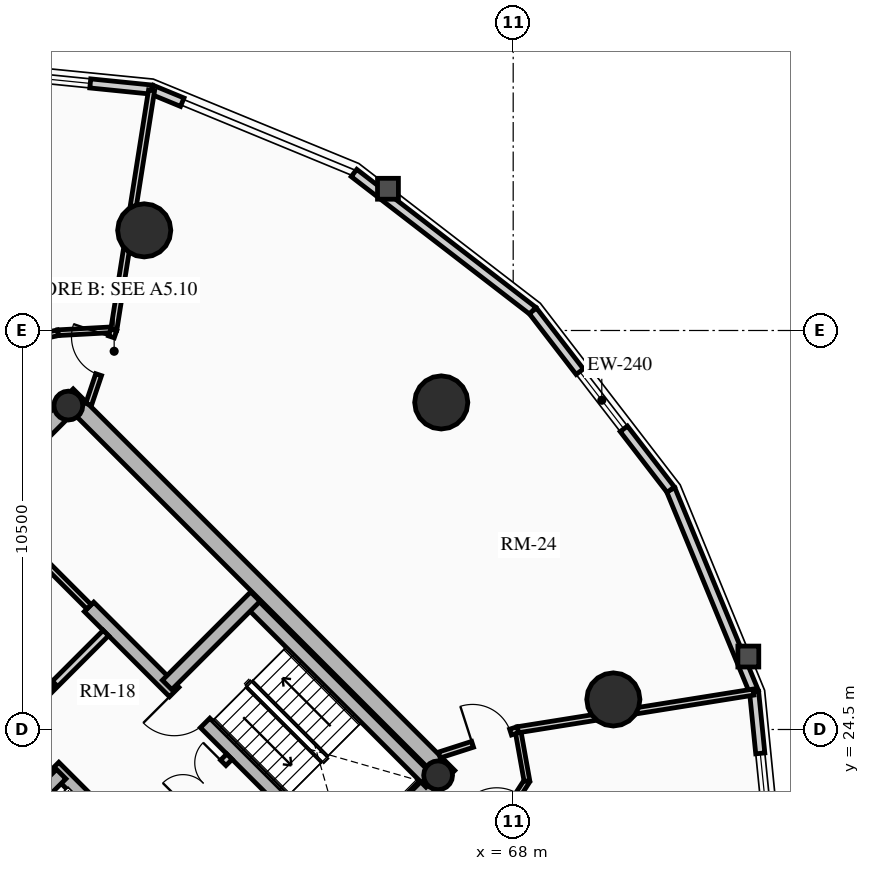
"""IFC4 building model, lengths in metres.
Left out: names, types, materials, properties, quantities, classifications, styles, units other than length and angle.
Written with IfcOpenShell. Run it as: python <this file> out.ifc"""

import sys

from ifc_helpers import new_model, si_unit, direction, frame, frame_2d, origin, origin_2d, place, context, subcontext, project, spatial, rectangle, circle, hollow_circle, extrude, source, transform, mapped, element, fill, save


model = new_model("IFC4")
c1 = context("Model", 3, precision=1e-05, world=origin(), true_north=direction((0.0, 1.0)))
c2 = subcontext(c1, "Body", "Model", "MODEL_VIEW")
j1 = project(units=[si_unit("LENGTHUNIT", "METRE"), si_unit("PLANEANGLEUNIT", "RADIAN")], contexts=[c1])
p1 = place(None, origin())
s1 = spatial("IfcSite", under=j1, at=p1, CompositionType="ELEMENT")
p2 = place(p1, origin())
s2 = spatial("IfcBuilding", under=s1, at=p2, CompositionType="ELEMENT")
p3 = place(p2, frame((0.0, 0.0, 136.6)))
s3 = spatial("IfcBuildingStorey", under=s2, at=p3, CompositionType="ELEMENT", Elevation=136.6)
for number, where, z_axis, x_axis in (
    (1, (58.737, 15.697, 0.0), (0.0, 0.0, 1.0), (-0.707, 0.707, 0.0)),
    (2, (66.303, 23.263, 0.0), (0.0, 0.0, 1.0), (-0.707, 0.707, 0.0)),
):
    element("IfcWall", number, at=place(p3, frame(where, z_axis=z_axis, x_axis=x_axis)), inside=s3, PredefinedType="SHEAR", context=c2, shape_type="SweptSolid", body=[
        extrude(rectangle(XDim=14.2, YDim=0.45, at=frame_2d((7.1, 0.0))), origin(), (0.0, 0.0, 1.0), 3.72),
    ])
p4 = place(p3, frame((58.578, 15.856, 0.0), z_axis=(0.0, 0.0, 1.0), x_axis=(0.707106781187, 0.707106781187, 0.0)))
e3 = element("IfcWall", 3, at=p4, inside=s3, PredefinedType="SHEAR", context=c2, shape_type="SweptSolid", body=[
    extrude(rectangle(XDim=10.7, YDim=0.45, at=frame_2d((5.35, 0.0))), origin(), (0.0, 0.0, 1.0), 3.72),
])
m1 = source(origin(), c2, "Body", "SweptSolid", [
    extrude(rectangle(XDim=1.5, YDim=2.02, at=frame_2d((0.75, 1.01))), frame((0.0, 0.235, 0.0), z_axis=(0.0, -1.0, 0.0), x_axis=(1.0, 0.0, 0.0)), (0.0, 0.0, 1.0), 0.47),
])
p5 = place(p4, frame((5.45, 0.0, 0.0)))
e4 = element("IfcOpeningElement", 4, at=p5, cuts=e3, PredefinedType="OPENING", context=c2, shape_type="MappedRepresentation", body=[
    mapped(m1, transform((0.0, 0.0, 0.0), x_axis=(1.0, 0.0, 0.0), y_axis=(0.0, 1.0, 0.0), z_axis=(0.0, 0.0, 1.0), scale=1.0)),
])
p6 = place(p3, frame((48.856, 25.578, 0.0), z_axis=(0.0, 0.0, 1.0), x_axis=(0.707106781187, 0.707106781187, 0.0)))
e5 = element("IfcWall", 5, at=p6, inside=s3, PredefinedType="SHEAR", context=c2, shape_type="SweptSolid", body=[
    extrude(rectangle(XDim=10.7, YDim=0.45, at=frame_2d((5.35, 0.0))), origin(), (0.0, 0.0, 1.0), 3.72),
])
p7 = place(p6, frame((4.6, 0.0, 0.0)))
e6 = element("IfcOpeningElement", 6, at=p7, cuts=e5, PredefinedType="OPENING", context=c2, shape_type="MappedRepresentation", body=[
    mapped(m1, transform((0.0, 0.0, 0.0), x_axis=(1.0, 0.0, 0.0), y_axis=(0.0, 1.0, 0.0), z_axis=(0.0, 0.0, 1.0), scale=1.0)),
])
p8 = place(p3, frame((61.078, 18.355, 0.0), z_axis=(0.0, 0.0, 1.0), x_axis=(-0.707106781187, 0.707106781187, 0.0)))
e7 = element("IfcWall", 7, at=p8, inside=s3, PredefinedType="SHEAR", context=c2, shape_type="SweptSolid", body=[
    extrude(rectangle(XDim=13.75, YDim=0.35, at=frame_2d((6.875, 0.0))), origin(), (0.0, 0.0, 1.0), 3.72),
])
m2 = source(origin(), c2, "Body", "SweptSolid", [
    extrude(rectangle(XDim=1.1, YDim=2.015, at=frame_2d((0.55, 1.007))), frame((0.0, 0.185, 0.0), z_axis=(0.0, -1.0, 0.0), x_axis=(1.0, 0.0, 0.0)), (0.0, 0.0, 1.0), 0.37),
])
p9 = place(p8, frame((4.875, 0.0, 0.0)))
e8 = element("IfcOpeningElement", 8, at=p9, cuts=e7, PredefinedType="OPENING", context=c2, shape_type="MappedRepresentation", body=[
    mapped(m2, transform((0.0, 0.0, 0.0), x_axis=(1.0, 0.0, 0.0), y_axis=(0.0, 1.0, 0.0), z_axis=(0.0, 0.0, 1.0), scale=1.0)),
])
p10 = place(p8, frame((0.65, 0.0, 0.0)))
e9 = element("IfcOpeningElement", 9, at=p10, cuts=e7, PredefinedType="OPENING", context=c2, shape_type="MappedRepresentation", body=[
    mapped(m2, transform((0.0, 0.0, 0.0), x_axis=(1.0, 0.0, 0.0), y_axis=(0.0, 1.0, 0.0), z_axis=(0.0, 0.0, 1.0), scale=1.0)),
])
p11 = place(p8, frame((2.65, 0.0, 0.0)))
e10 = element("IfcOpeningElement", 10, at=p11, cuts=e7, PredefinedType="OPENING", context=c2, shape_type="MappedRepresentation", body=[
    mapped(m2, transform((0.0, 0.0, 0.0), x_axis=(1.0, 0.0, 0.0), y_axis=(0.0, 1.0, 0.0), z_axis=(0.0, 0.0, 1.0), scale=1.0)),
])
m3 = source(origin(), c2, "Body", "SweptSolid", [
    extrude(rectangle(XDim=1.15, YDim=2.02, at=frame_2d((0.575, 1.01))), frame((0.0, 0.185, 0.0), z_axis=(0.0, -1.0, 0.0), x_axis=(1.0, 0.0, 0.0)), (0.0, 0.0, 1.0), 0.37),
])
p12 = place(p8, frame((7.295, 0.0, 0.0)))
e11 = element("IfcOpeningElement", 11, at=p12, cuts=e7, PredefinedType="OPENING", context=c2, shape_type="MappedRepresentation", body=[
    mapped(m3, transform((0.0, 0.0, 0.0), x_axis=(1.0, 0.0, 0.0), y_axis=(0.0, 1.0, 0.0), z_axis=(0.0, 0.0, 1.0), scale=1.0)),
])
p13 = place(p3, frame((63.645, 20.922, 0.0), z_axis=(0.0, 0.0, 1.0), x_axis=(-0.70711946392, 0.707094098226, 0.0)))
e12 = element("IfcWall", 12, at=p13, inside=s3, PredefinedType="SHEAR", context=c2, shape_type="SweptSolid", body=[
    extrude(rectangle(XDim=9.625, YDim=0.35, at=frame_2d((4.812, 0.0))), origin(), (0.0, 0.0, 1.0), 3.72),
])
p14 = place(p13, frame((5.305, 0.0, 0.0)))
e13 = element("IfcOpeningElement", 13, at=p14, cuts=e12, PredefinedType="OPENING", context=c2, shape_type="MappedRepresentation", body=[
    mapped(m3, transform((0.0, 0.0, 0.0), x_axis=(1.0, 0.0, 0.0), y_axis=(0.0, 1.0, 0.0), z_axis=(0.0, 0.0, 1.0), scale=1.0)),
])
p15 = place(p3, frame((53.784, 21.003, 0.0), z_axis=(0.0, 0.0, 1.0), x_axis=(0.707106781187, 0.707106781187, 0.0)))
e14 = element("IfcWall", 14, at=p15, inside=s3, PredefinedType="SHEAR", context=c2, shape_type="SweptSolid", body=[
    extrude(rectangle(XDim=3.285, YDim=0.35, at=frame_2d((1.643, 0.0))), origin(), (0.0, 0.0, 1.0), 3.72),
])
p16 = place(p3, frame((65.83, 23.107, 0.0), z_axis=(0.0, 0.0, 1.0), x_axis=(-0.707088616009, 0.707124945897, 0.0)))
e15 = element("IfcWall", 15, at=p16, inside=s3, PredefinedType="SHEAR", context=c2, shape_type="SweptSolid", body=[
    extrude(rectangle(XDim=6.72, YDim=0.35, at=frame_2d((3.36, 0.0))), origin(), (0.0, 0.0, 1.0), 3.72),
])
p17 = place(p3, frame((58.893, 25.674, 0.0), z_axis=(0.0, 0.0, 1.0), x_axis=(0.707106781187, 0.707106781187, 0.0)))
e16 = element("IfcWall", 16, at=p17, inside=s3, PredefinedType="SHEAR", context=c2, shape_type="SweptSolid", body=[
    extrude(rectangle(XDim=3.285, YDim=0.35, at=frame_2d((1.643, 0.0))), origin(), (0.0, 0.0, 1.0), 3.72),
])
for number, where, z_axis, x_axis in (
    (17, (66.024, 23.294, 0.0), (0.0, 0.0, 1.0), (0.707, 0.707, 0.0)),
    (18, (56.294, 33.024, 0.0), (0.0, 0.0, 1.0), (0.707, 0.707, 0.0)),
):
    element("IfcColumn", number, at=place(p3, frame(where, z_axis=z_axis, x_axis=x_axis)), inside=s3, PredefinedType="COLUMN", context=c2, shape_type="SweptSolid", body=[
        extrude(hollow_circle(Radius=0.38, WallThickness=0.032, at=origin_2d()), origin(), (0.0, 0.0, 1.0), 3.72),
    ])
for number, where, z_axis, x_axis in (
    (19, (66.107, 33.107, 0.0), (0.0, 0.0, 1.0), (1.0, 0.0, 0.0)),
    (20, (58.291, 37.635, 0.0), (0.0, 0.0, 1.0), (1.0, 0.0, 0.0)),
    (21, (70.635, 25.291, 0.0), (0.0, 0.0, 1.0), (1.0, 0.0, 0.0)),
):
    element("IfcColumn", number, at=place(p3, frame(where, z_axis=z_axis, x_axis=x_axis)), inside=s3, PredefinedType="USERDEFINED", context=c2, shape_type="SweptSolid", body=[
        extrude(circle(Radius=0.7, at=origin_2d()), origin(), (0.0, 0.0, 1.0), 3.72),
    ])
p18 = place(p3, frame((63.811, 39.145, 0.0), z_axis=(0.0, 0.0, 1.0), x_axis=(0.791982052206, -0.61054437102, 0.0)))
e22 = element("IfcWall", 22, at=p18, inside=s3, PredefinedType="SOLIDWALL", context=c2, shape_type="SweptSolid", body=[
    extrude(rectangle(XDim=5.942, YDim=0.24, at=frame_2d((2.971, 0.0))), origin(), (0.0, 0.0, 1.0), 2.949),
])
p19 = place(p3, frame((58.487, 41.339, 0.0), z_axis=(0.0, 0.0, 1.0), x_axis=(0.924556017656, -0.381046152345, 0.0)))
e23 = element("IfcWall", 23, at=p19, inside=s3, PredefinedType="SOLIDWALL", context=c2, shape_type="SweptSolid", body=[
    extrude(rectangle(XDim=0.87, YDim=0.24, at=frame_2d((0.435, 0.0))), origin(), (0.0, 0.0, 1.0), 2.949),
])
p20 = place(p3, frame((53.067, 41.885, 0.0), z_axis=(0.0, 0.0, 1.0), x_axis=(0.994971754311, -0.10015591906, 0.0)))
e24 = element("IfcWall", 24, at=p20, inside=s3, PredefinedType="SOLIDWALL", context=c2, shape_type="SweptSolid", body=[
    extrude(rectangle(XDim=5.448, YDim=0.24, at=frame_2d((2.724, 0.0))), origin(), (0.0, 0.0, 1.0), 2.949),
])
m4 = source(origin(), c2, "Body", "SweptSolid", [
    extrude(rectangle(XDim=2.2, YDim=1.35, at=frame_2d((1.1, 0.675))), frame((0.0, 0.13, 0.0), z_axis=(0.0, -1.0, 0.0), x_axis=(1.0, 0.0, 0.0)), (0.0, 0.0, 1.0), 0.26),
])
p21 = place(p20, frame((1.624, 0.0, 0.65)))
e25 = element("IfcOpeningElement", 25, at=p21, cuts=e24, PredefinedType="OPENING", context=c2, shape_type="MappedRepresentation", body=[
    mapped(m4, transform((0.0, 0.0, 0.0), x_axis=(1.0, 0.0, 0.0), y_axis=(0.0, 1.0, 0.0), z_axis=(0.0, 0.0, 1.0), scale=1.0)),
])
p22 = place(p3, frame((74.339, 25.487, 0.0), z_axis=(0.0, 0.0, 1.0), x_axis=(0.10015591906, -0.994971754311, 0.0)))
e26 = element("IfcWall", 26, at=p22, inside=s3, PredefinedType="SOLIDWALL", context=c2, shape_type="SweptSolid", body=[
    extrude(rectangle(XDim=5.448, YDim=0.24, at=frame_2d((2.724, 0.0))), origin(), (0.0, 0.0, 1.0), 2.949),
])
p23 = place(p22, frame((1.624, 0.0, 0.65)))
e27 = element("IfcOpeningElement", 27, at=p23, cuts=e26, PredefinedType="OPENING", context=c2, shape_type="MappedRepresentation", body=[
    mapped(m4, transform((0.0, 0.0, 0.0), x_axis=(1.0, 0.0, 0.0), y_axis=(0.0, 1.0, 0.0), z_axis=(0.0, 0.0, 1.0), scale=1.0)),
])
p24 = place(p3, frame((72.145, 30.811, 0.0), z_axis=(0.0, 0.0, 1.0), x_axis=(0.381027003055, -0.924563909604, 0.0)))
e28 = element("IfcWall", 28, at=p24, inside=s3, PredefinedType="SOLIDWALL", context=c2, shape_type="SweptSolid", body=[
    extrude(rectangle(XDim=5.758, YDim=0.24, at=frame_2d((2.879, 0.0))), origin(), (0.0, 0.0, 1.0), 2.949),
])
p25 = place(p3, frame((68.517, 35.517, 0.0), z_axis=(0.0, 0.0, 1.0), x_axis=(0.61054437102, -0.791982052206, 0.0)))
e29 = element("IfcWall", 29, at=p25, inside=s3, PredefinedType="SOLIDWALL", context=c2, shape_type="SweptSolid", body=[
    extrude(rectangle(XDim=5.942, YDim=0.24, at=frame_2d((2.971, 0.0))), origin(), (0.0, 0.0, 1.0), 2.949),
])
m5 = source(origin(), c2, "Body", "SweptSolid", [
    extrude(rectangle(XDim=1.9, YDim=1.35, at=frame_2d((0.95, 0.675))), frame((0.0, 0.13, 0.0), z_axis=(0.0, -1.0, 0.0), x_axis=(1.0, 0.0, 0.0)), (0.0, 0.0, 1.0), 0.26),
])
p26 = place(p25, frame((2.021, 0.0, 0.65)))
e30 = element("IfcOpeningElement", 30, at=p26, cuts=e29, PredefinedType="OPENING", context=c2, shape_type="MappedRepresentation", body=[
    mapped(m5, transform((0.0, 0.0, 0.0), x_axis=(1.0, 0.0, 0.0), y_axis=(0.0, 1.0, 0.0), z_axis=(0.0, 0.0, 1.0), scale=1.0)),
])
p27 = place(p3, frame((58.214, 21.467, 0.0), z_axis=(0.0, 0.0, 1.0), x_axis=(0.707106781187, 0.707106781187, 0.0)))
e31 = element("IfcWall", 31, at=p27, inside=s3, PredefinedType="PARTITIONING", context=c2, shape_type="SweptSolid", body=[
    extrude(rectangle(XDim=3.28, YDim=0.2, at=frame_2d((1.64, 0.0))), origin(), (0.0, 0.0, 1.0), 3.425),
])
m6 = source(origin(), c2, "Body", "SweptSolid", [
    extrude(rectangle(XDim=1.5, YDim=2.02, at=frame_2d((0.75, 1.01))), frame((0.0, 0.11, 0.0), z_axis=(0.0, -1.0, 0.0), x_axis=(1.0, 0.0, 0.0)), (0.0, 0.0, 1.0), 0.22),
])
p28 = place(p27, frame((1.55, 0.0, 0.0)))
e32 = element("IfcOpeningElement", 32, at=p28, cuts=e31, PredefinedType="OPENING", context=c2, shape_type="MappedRepresentation", body=[
    mapped(m6, transform((0.0, 0.0, 0.0), x_axis=(1.0, 0.0, 0.0), y_axis=(0.0, 1.0, 0.0), z_axis=(0.0, 0.0, 1.0), scale=1.0)),
])
p29 = place(p3, frame((54.961, 24.719, 0.0), z_axis=(0.0, 0.0, 1.0), x_axis=(0.707106781187, 0.707106781187, 0.0)))
e33 = element("IfcWall", 33, at=p29, inside=s3, PredefinedType="PARTITIONING", context=c2, shape_type="SweptSolid", body=[
    extrude(rectangle(XDim=3.28, YDim=0.2, at=frame_2d((1.64, 0.0))), origin(), (0.0, 0.0, 1.0), 3.425),
])
m7 = source(origin(), c2, "Body", "SweptSolid", [
    extrude(rectangle(XDim=0.9, YDim=2.005, at=frame_2d((0.45, 1.002))), frame((0.0, 0.11, 0.0), z_axis=(0.0, -1.0, 0.0), x_axis=(1.0, 0.0, 0.0)), (0.0, 0.0, 1.0), 0.22),
])
p30 = place(p29, frame((0.16, 0.0, 0.0)))
e34 = element("IfcOpeningElement", 34, at=p30, cuts=e33, PredefinedType="OPENING", context=c2, shape_type="MappedRepresentation", body=[
    mapped(m7, transform((0.0, 0.0, 0.0), x_axis=(1.0, 0.0, 0.0), y_axis=(0.0, 1.0, 0.0), z_axis=(0.0, 0.0, 1.0), scale=1.0)),
])
p31 = place(p3, frame((55.874, 25.631, 0.0), z_axis=(0.0, 0.0, 1.0), x_axis=(-0.707157639372, 0.707055919343, 0.0)))
e35 = element("IfcWall", 35, at=p31, inside=s3, PredefinedType="PARTITIONING", context=c2, shape_type="SweptSolid", body=[
    extrude(rectangle(XDim=2.4, YDim=0.2, at=frame_2d((1.2, 0.0))), origin(), (0.0, 0.0, 1.0), 3.425),
])
p32 = place(p3, frame((56.839, 27.728, 0.0), z_axis=(0.0, 0.0, 1.0), x_axis=(-0.707106781187, 0.707106781187, 0.0)))
e36 = element("IfcWall", 36, at=p32, inside=s3, PredefinedType="PARTITIONING", context=c2, shape_type="SweptSolid", body=[
    extrude(rectangle(XDim=3.9, YDim=0.16, at=frame_2d((1.95, 0.0))), origin(), (0.0, 0.0, 1.0), 3.425),
])
m8 = source(origin(), c2, "Body", "SweptSolid", [
    extrude(rectangle(XDim=0.9, YDim=2.005, at=frame_2d((0.45, 1.002))), frame((0.0, 0.09, 0.0), z_axis=(0.0, -1.0, 0.0), x_axis=(1.0, 0.0, 0.0)), (0.0, 0.0, 1.0), 0.18),
])
p33 = place(p32, frame((2.2, 0.0, 0.0)))
e37 = element("IfcOpeningElement", 37, at=p33, cuts=e36, PredefinedType="OPENING", context=c2, shape_type="MappedRepresentation", body=[
    mapped(m8, transform((0.0, 0.0, 0.0), x_axis=(1.0, 0.0, 0.0), y_axis=(0.0, 1.0, 0.0), z_axis=(0.0, 0.0, 1.0), scale=1.0)),
])
p34 = place(p3, frame((57.491, 35.021, 0.0), z_axis=(0.0, 0.0, 1.0), x_axis=(-0.9985194771, -0.054395347698, 0.0)))
e38 = element("IfcWall", 38, at=p34, inside=s3, PredefinedType="PARTITIONING", context=c2, shape_type="SweptSolid", body=[
    extrude(rectangle(XDim=1.472, YDim=0.15, at=frame_2d((0.736, 0.0))), origin(), (0.0, 0.0, 1.0), 2.995),
])
p35 = place(p3, frame((56.021, 34.941, 0.0), z_axis=(0.0, 0.0, 1.0), x_axis=(-0.975309543901, -0.220842236847, 0.0)))
e39 = element("IfcWall", 39, at=p35, inside=s3, PredefinedType="PARTITIONING", context=c2, shape_type="SweptSolid", body=[
    extrude(rectangle(XDim=1.585, YDim=0.15, at=frame_2d((0.792, 0.0))), origin(), (0.0, 0.0, 1.0), 2.995),
])
p36 = place(p3, frame((67.343, 21.569, 0.0), z_axis=(0.0, 0.0, 1.0), x_axis=(0.542722446786, 0.83991210597, 0.0)))
e40 = element("IfcWall", 40, at=p36, inside=s3, PredefinedType="PARTITIONING", context=c2, shape_type="SweptSolid", body=[
    extrude(rectangle(XDim=1.876, YDim=0.15, at=frame_2d((0.938, 0.0))), origin(), (0.0, 0.0, 1.0), 2.995),
])
m9 = source(origin(), c2, "Body", "SweptSolid", [
    extrude(rectangle(XDim=1.05, YDim=2.015, at=frame_2d((0.525, 1.007))), frame((0.0, 0.085, 0.0), z_axis=(0.0, -1.0, 0.0), x_axis=(1.0, 0.0, 0.0)), (0.0, 0.0, 1.0), 0.17),
])
p37 = place(p36, frame((0.413, 0.0, 0.0)))
e41 = element("IfcOpeningElement", 41, at=p37, cuts=e40, PredefinedType="OPENING", context=c2, shape_type="MappedRepresentation", body=[
    mapped(m9, transform((0.0, 0.0, 0.0), x_axis=(1.0, 0.0, 0.0), y_axis=(0.0, 1.0, 0.0), z_axis=(0.0, 0.0, 1.0), scale=1.0)),
])
p38 = place(p3, frame((68.362, 23.145, 0.0), z_axis=(0.0, 0.0, 1.0), x_axis=(-0.175605524171, 0.984460613677, 0.0)))
e42 = element("IfcWall", 42, at=p38, inside=s3, PredefinedType="PARTITIONING", context=c2, shape_type="SweptSolid", body=[
    extrude(rectangle(XDim=1.369, YDim=0.15, at=frame_2d((0.685, 0.0))), origin(), (0.0, 0.0, 1.0), 2.995),
])
p39 = place(p3, frame((57.491, 35.021, 0.0), z_axis=(0.0, 0.0, 1.0), x_axis=(0.155805268746, 0.98778779008, 0.0)))
e43 = element("IfcWall", 43, at=p39, inside=s3, PredefinedType="PARTITIONING", context=c2, shape_type="SweptSolid", body=[
    extrude(rectangle(XDim=6.376, YDim=0.16, at=frame_2d((3.188, 0.0))), origin(), (0.0, 0.0, 1.0), 2.949),
])
p40 = place(p3, frame((68.121, 24.493, 0.0), z_axis=(0.0, 0.0, 1.0), x_axis=(0.987466345552, 0.15782970697, 0.0)))
e44 = element("IfcWall", 44, at=p40, inside=s3, PredefinedType="PARTITIONING", context=c2, shape_type="SweptSolid", body=[
    extrude(rectangle(XDim=6.277, YDim=0.16, at=frame_2d((3.139, 0.0))), origin(), (0.0, 0.0, 1.0), 2.949),
])
p41 = place(p3, frame((56.828, 33.056, 0.0), z_axis=(0.0, 0.0, 1.0), x_axis=(0.319439175969, 0.94760678177, 0.0)))
e45 = element("IfcWall", 45, at=p41, inside=s3, PredefinedType="PARTITIONING", context=c2, shape_type="SweptSolid", body=[
    extrude(rectangle(XDim=2.074, YDim=0.16, at=frame_2d((1.037, 0.0))), origin(), (0.0, 0.0, 1.0), 2.995),
])
m10 = source(origin(), c2, "Body", "SweptSolid", [
    extrude(rectangle(XDim=1.05, YDim=2.015, at=frame_2d((0.525, 1.007))), frame((0.0, 0.09, 0.0), z_axis=(0.0, -1.0, 0.0), x_axis=(1.0, 0.0, 0.0)), (0.0, 0.0, 1.0), 0.18),
])
p42 = place(p41, frame((0.824, 0.0, 0.0)))
e46 = element("IfcOpeningElement", 46, at=p42, cuts=e45, PredefinedType="OPENING", context=c2, shape_type="MappedRepresentation", body=[
    mapped(m10, transform((0.0, 0.0, 0.0), x_axis=(1.0, 0.0, 0.0), y_axis=(0.0, 1.0, 0.0), z_axis=(0.0, 0.0, 1.0), scale=1.0)),
])
p43 = place(p3, frame((66.056, 23.828, 0.0), z_axis=(0.0, 0.0, 1.0), x_axis=(0.951830504244, 0.306624674792, 0.0)))
e47 = element("IfcWall", 47, at=p43, inside=s3, PredefinedType="PARTITIONING", context=c2, shape_type="SweptSolid", body=[
    extrude(rectangle(XDim=2.17, YDim=0.16, at=frame_2d((1.085, 0.0))), origin(), (0.0, 0.0, 1.0), 2.995),
])
p44 = place(p43, frame((0.92, 0.0, 0.0)))
e48 = element("IfcOpeningElement", 48, at=p44, cuts=e47, PredefinedType="OPENING", context=c2, shape_type="MappedRepresentation", body=[
    mapped(m10, transform((0.0, 0.0, 0.0), x_axis=(1.0, 0.0, 0.0), y_axis=(0.0, 1.0, 0.0), z_axis=(0.0, 0.0, 1.0), scale=1.0)),
])
m11 = source(origin(), c2, "Body", "SweptSolid", [
    extrude(rectangle(XDim=2.2, YDim=1.35, at=frame_2d((1.1, 0.675))), frame((0.0, 0.03, 0.0), z_axis=(0.0, -1.0, 0.0), x_axis=(1.0, 0.0, 0.0)), (0.0, 0.0, 1.0), 0.06),
])
p45 = place(p21, origin())
e49 = element("IfcWindow", 49, at=p45, inside=s3, PartitioningType="DOUBLE_PANEL_VERTICAL", PredefinedType="WINDOW", context=c2, shape_type="MappedRepresentation", body=[
    mapped(m11, transform((0.0, 0.0, 0.0), x_axis=(1.0, 0.0, 0.0), y_axis=(0.0, 1.0, 0.0), z_axis=(0.0, 0.0, 1.0), scale=1.0)),
])
fill(e25, e49)
p46 = place(p23, origin())
e50 = element("IfcWindow", 50, at=p46, inside=s3, PartitioningType="DOUBLE_PANEL_VERTICAL", PredefinedType="WINDOW", context=c2, shape_type="MappedRepresentation", body=[
    mapped(m11, transform((0.0, 0.0, 0.0), x_axis=(1.0, 0.0, 0.0), y_axis=(0.0, 1.0, 0.0), z_axis=(0.0, 0.0, 1.0), scale=1.0)),
])
fill(e27, e50)
m12 = source(origin(), c2, "Body", "SweptSolid", [
    extrude(rectangle(XDim=1.9, YDim=1.35, at=frame_2d((0.95, 0.675))), frame((0.0, 0.03, 0.0), z_axis=(0.0, -1.0, 0.0), x_axis=(1.0, 0.0, 0.0)), (0.0, 0.0, 1.0), 0.06),
])
p47 = place(p26, origin())
e51 = element("IfcWindow", 51, at=p47, inside=s3, PartitioningType="DOUBLE_PANEL_VERTICAL", PredefinedType="WINDOW", context=c2, shape_type="MappedRepresentation", body=[
    mapped(m12, transform((0.0, 0.0, 0.0), x_axis=(1.0, 0.0, 0.0), y_axis=(0.0, 1.0, 0.0), z_axis=(0.0, 0.0, 1.0), scale=1.0)),
])
fill(e30, e51)
m13 = source(origin(), c2, "Body", "SweptSolid", [
    extrude(rectangle(XDim=1.15, YDim=2.02, at=frame_2d((0.575, 1.01))), frame((0.0, 0.025, 0.0), z_axis=(0.0, -1.0, 0.0), x_axis=(1.0, 0.0, 0.0)), (0.0, 0.0, 1.0), 0.05),
])
p48 = place(p12, origin())
e52 = element("IfcDoor", 52, at=p48, inside=s3, OperationType="SINGLE_SWING_LEFT", PredefinedType="DOOR", context=c2, shape_type="MappedRepresentation", body=[
    mapped(m13, transform((0.0, 0.0, 0.0), x_axis=(1.0, 0.0, 0.0), y_axis=(0.0, 1.0, 0.0), z_axis=(0.0, 0.0, 1.0), scale=1.0)),
])
fill(e11, e52)
p49 = place(p14, origin())
e53 = element("IfcDoor", 53, at=p49, inside=s3, OperationType="SINGLE_SWING_RIGHT", PredefinedType="DOOR", context=c2, shape_type="MappedRepresentation", body=[
    mapped(m13, transform((0.0, 0.0, 0.0), x_axis=(1.0, 0.0, 0.0), y_axis=(0.0, 1.0, 0.0), z_axis=(0.0, 0.0, 1.0), scale=1.0)),
])
fill(e13, e53)
m14 = source(origin(), c2, "Body", "SweptSolid", [
    extrude(rectangle(XDim=1.5, YDim=2.02, at=frame_2d((0.75, 1.01))), frame((0.0, 0.025, 0.0), z_axis=(0.0, -1.0, 0.0), x_axis=(1.0, 0.0, 0.0)), (0.0, 0.0, 1.0), 0.05),
])
p50 = place(p28, origin())
e54 = element("IfcDoor", 54, at=p50, inside=s3, OperationType="DOUBLE_DOOR_SINGLE_SWING", PredefinedType="DOOR", context=c2, shape_type="MappedRepresentation", body=[
    mapped(m14, transform((0.0, 0.0, 0.0), x_axis=(1.0, 0.0, 0.0), y_axis=(0.0, 1.0, 0.0), z_axis=(0.0, 0.0, 1.0), scale=1.0)),
])
fill(e32, e54)
m15 = source(origin(), c2, "Body", "SweptSolid", [
    extrude(rectangle(XDim=1.05, YDim=2.015, at=frame_2d((0.525, 1.007))), frame((0.0, 0.025, 0.0), z_axis=(0.0, -1.0, 0.0), x_axis=(1.0, 0.0, 0.0)), (0.0, 0.0, 1.0), 0.05),
])
p51 = place(p42, origin())
e55 = element("IfcDoor", 55, at=p51, inside=s3, OperationType="SINGLE_SWING_RIGHT", PredefinedType="DOOR", context=c2, shape_type="MappedRepresentation", body=[
    mapped(m15, transform((0.0, 0.0, 0.0), x_axis=(1.0, 0.0, 0.0), y_axis=(0.0, 1.0, 0.0), z_axis=(0.0, 0.0, 1.0), scale=1.0)),
])
fill(e46, e55)
p52 = place(p44, origin())
e56 = element("IfcDoor", 56, at=p52, inside=s3, OperationType="SINGLE_SWING_LEFT", PredefinedType="DOOR", context=c2, shape_type="MappedRepresentation", body=[
    mapped(m15, transform((0.0, 0.0, 0.0), x_axis=(1.0, 0.0, 0.0), y_axis=(0.0, 1.0, 0.0), z_axis=(0.0, 0.0, 1.0), scale=1.0)),
])
fill(e48, e56)
save(model, sys.argv[1])
